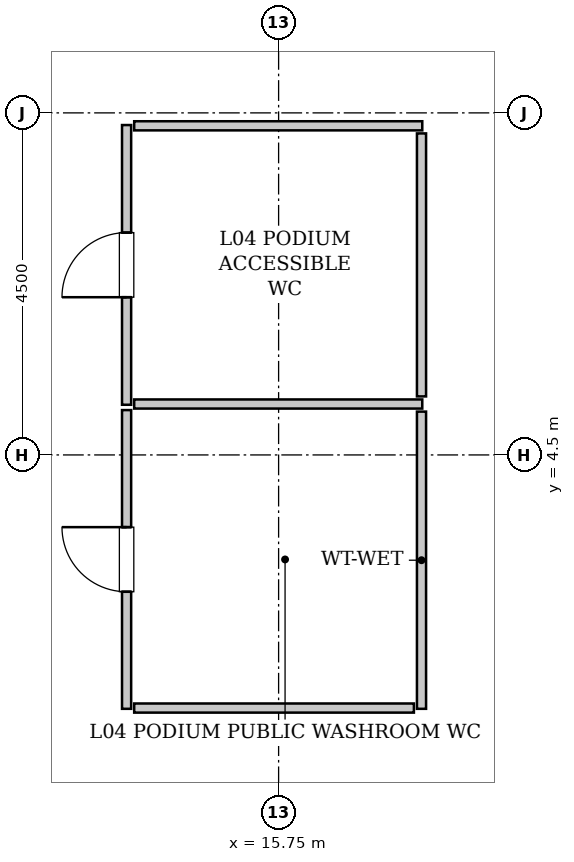
"""IFC4 building model, lengths in metres.
Left out: names, types, materials, properties, quantities, classifications, styles, units other than length and angle.
Written with IfcOpenShell. Run it as: python <this file> out.ifc"""

import sys

from ifc_helpers import new_model, si_unit, direction, frame, frame_2d, origin, place, context, subcontext, project, spatial, rectangle, extrude, source, transform, mapped, element, fill, save


model = new_model("IFC4")
c1 = context("Model", 3, precision=1e-05, world=origin(), true_north=direction((0.0, 1.0)))
c2 = subcontext(c1, "Body", "Model", "MODEL_VIEW")
j1 = project(units=[si_unit("LENGTHUNIT", "METRE"), si_unit("PLANEANGLEUNIT", "RADIAN")], contexts=[c1])
p1 = place(None, origin())
s1 = spatial("IfcSite", under=j1, at=p1, CompositionType="ELEMENT")
p2 = place(p1, origin())
s2 = spatial("IfcBuilding", under=s1, at=p2, CompositionType="ELEMENT")
p3 = place(p2, frame((0.0, 0.0, 22.2)))
s3 = spatial("IfcBuildingStorey", under=s2, at=p3, CompositionType="ELEMENT", Elevation=22.2)
m1 = source(origin(), c2, "Body", "SweptSolid", [
    extrude(rectangle(XDim=3.68, YDim=0.12, at=frame_2d((1.84, 0.0))), origin(), (0.0, 0.0, 1.0), 4.905),
])
p4 = place(p3, frame((13.75, 5.16, 0.0), z_axis=(0.0, 0.0, 1.0), x_axis=(0.0, 1.0, 0.0)))
e1 = element("IfcWall", 1, at=p4, inside=s3, PredefinedType="PLUMBINGWALL", context=c2, shape_type="MappedRepresentation", body=[
    mapped(m1, transform((0.0, 0.0, 0.0), x_axis=(1.0, 0.0, 0.0), y_axis=(0.0, 1.0, 0.0), z_axis=(0.0, 0.0, 1.0), scale=1.0)),
])
p5 = place(p4, frame((1.415, 0.0, 0.0)))
e2 = element("IfcOpeningElement", 2, at=p5, cuts=e1, PredefinedType="OPENING", context=c2, shape_type="SweptSolid", body=[
    extrude(rectangle(XDim=0.85, YDim=2.1, at=frame_2d((0.425, 1.05))), frame((0.0, 0.07, 0.0), z_axis=(0.0, -1.0, 0.0), x_axis=(1.0, 0.0, 0.0)), (0.0, 0.0, 1.0), 0.14),
])
m2 = source(origin(), c2, "Body", "SweptSolid", [
    extrude(rectangle(XDim=3.79, YDim=0.12, at=frame_2d((1.895, 0.0))), origin(), (0.0, 0.0, 1.0), 4.905),
])
p6 = place(p3, frame((13.85, 5.17, 0.0), z_axis=(0.0, 0.0, 1.0), x_axis=(1.0, 0.0, 0.0)))
e3 = element("IfcWall", 3, at=p6, inside=s3, PredefinedType="PLUMBINGWALL", context=c2, shape_type="MappedRepresentation", body=[
    mapped(m2, transform((0.0, 0.0, 0.0), x_axis=(1.0, 0.0, 0.0), y_axis=(0.0, 1.0, 0.0), z_axis=(0.0, 0.0, 1.0), scale=1.0)),
])
m3 = source(origin(), c2, "Body", "SweptSolid", [
    extrude(rectangle(XDim=3.79, YDim=0.12, at=frame_2d((1.895, 0.0))), origin(), (0.0, 0.0, 1.0), 3.395),
])
p7 = place(p3, frame((13.85, 8.83, 0.0), z_axis=(0.0, 0.0, 1.0), x_axis=(1.0, 0.0, 0.0)))
e4 = element("IfcWall", 4, at=p7, inside=s3, PredefinedType="PLUMBINGWALL", context=c2, shape_type="MappedRepresentation", body=[
    mapped(m3, transform((0.0, 0.0, 0.0), x_axis=(1.0, 0.0, 0.0), y_axis=(0.0, 1.0, 0.0), z_axis=(0.0, 0.0, 1.0), scale=1.0)),
])
m4 = source(origin(), c2, "Body", "SweptSolid", [
    extrude(rectangle(XDim=3.46, YDim=0.12, at=frame_2d((1.73, 0.0))), origin(), (0.0, 0.0, 1.0), 4.445),
])
p8 = place(p3, frame((17.63, 5.27, 0.0), z_axis=(0.0, 0.0, 1.0), x_axis=(0.0, 1.0, 0.0)))
e5 = element("IfcWall", 5, at=p8, inside=s3, PredefinedType="PLUMBINGWALL", context=c2, shape_type="MappedRepresentation", body=[
    mapped(m4, transform((0.0, 0.0, 0.0), x_axis=(1.0, 0.0, 0.0), y_axis=(0.0, 1.0, 0.0), z_axis=(0.0, 0.0, 1.0), scale=1.0)),
])
m5 = source(origin(), c2, "Body", "SweptSolid", [
    extrude(rectangle(XDim=3.93, YDim=0.12, at=frame_2d((1.965, 0.0))), origin(), (0.0, 0.0, 1.0), 4.905),
])
p9 = place(p3, frame((13.75, 1.16, 0.0), z_axis=(0.0, 0.0, 1.0), x_axis=(0.0, 1.0, 0.0)))
e6 = element("IfcWall", 6, at=p9, inside=s3, PredefinedType="PLUMBINGWALL", context=c2, shape_type="MappedRepresentation", body=[
    mapped(m5, transform((0.0, 0.0, 0.0), x_axis=(1.0, 0.0, 0.0), y_axis=(0.0, 1.0, 0.0), z_axis=(0.0, 0.0, 1.0), scale=1.0)),
])
p10 = place(p9, frame((1.54, 0.0, 0.0)))
e7 = element("IfcOpeningElement", 7, at=p10, cuts=e6, PredefinedType="OPENING", context=c2, shape_type="SweptSolid", body=[
    extrude(rectangle(XDim=0.85, YDim=2.1, at=frame_2d((0.425, 1.05))), frame((0.0, 0.07, 0.0), z_axis=(0.0, -1.0, 0.0), x_axis=(1.0, 0.0, 0.0)), (0.0, 0.0, 1.0), 0.14),
])
m6 = source(origin(), c2, "Body", "SweptSolid", [
    extrude(rectangle(XDim=3.91, YDim=0.12, at=frame_2d((1.955, 0.0))), origin(), (0.0, 0.0, 1.0), 4.445),
])
p11 = place(p3, frame((17.63, 1.16, 0.0), z_axis=(0.0, 0.0, 1.0), x_axis=(0.0, 1.0, 0.0)))
e8 = element("IfcWall", 8, at=p11, inside=s3, PredefinedType="PLUMBINGWALL", context=c2, shape_type="MappedRepresentation", body=[
    mapped(m6, transform((0.0, 0.0, 0.0), x_axis=(1.0, 0.0, 0.0), y_axis=(0.0, 1.0, 0.0), z_axis=(0.0, 0.0, 1.0), scale=1.0)),
])
m7 = source(origin(), c2, "Body", "SweptSolid", [
    extrude(rectangle(XDim=3.68, YDim=0.12, at=frame_2d((1.84, 0.0))), origin(), (0.0, 0.0, 1.0), 4.905),
])
p12 = place(p3, frame((13.85, 1.17, 0.0), z_axis=(0.0, 0.0, 1.0), x_axis=(1.0, 0.0, 0.0)))
e9 = element("IfcWall", 9, at=p12, inside=s3, PredefinedType="PLUMBINGWALL", context=c2, shape_type="MappedRepresentation", body=[
    mapped(m7, transform((0.0, 0.0, 0.0), x_axis=(1.0, 0.0, 0.0), y_axis=(0.0, 1.0, 0.0), z_axis=(0.0, 0.0, 1.0), scale=1.0)),
])
m8 = source(origin(), c2, "Body", "SweptSolid", [
    extrude(rectangle(XDim=0.85, YDim=2.1, at=frame_2d((0.425, 1.05))), frame((0.0, 0.025, 0.0), z_axis=(0.0, -1.0, 0.0), x_axis=(1.0, 0.0, 0.0)), (0.0, 0.0, 1.0), 0.05),
])
p13 = place(p5, origin())
e10 = element("IfcDoor", 10, at=p13, inside=s3, OperationType="SINGLE_SWING_LEFT", PredefinedType="DOOR", context=c2, shape_type="MappedRepresentation", body=[
    mapped(m8, transform((0.0, 0.0, 0.0), x_axis=(1.0, 0.0, 0.0), y_axis=(0.0, 1.0, 0.0), z_axis=(0.0, 0.0, 1.0), scale=1.0)),
])
fill(e2, e10)
p14 = place(p10, origin())
e11 = element("IfcDoor", 11, at=p14, inside=s3, OperationType="SINGLE_SWING_RIGHT", PredefinedType="DOOR", context=c2, shape_type="MappedRepresentation", body=[
    mapped(m8, transform((0.0, 0.0, 0.0), x_axis=(1.0, 0.0, 0.0), y_axis=(0.0, 1.0, 0.0), z_axis=(0.0, 0.0, 1.0), scale=1.0)),
])
fill(e7, e11)
save(model, sys.argv[1])
